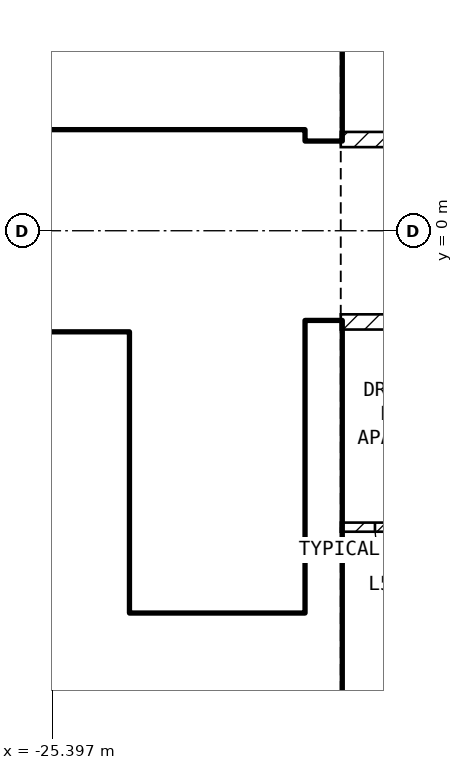
"""IFC4 building model, lengths in metres.
Left out: names, types, materials, properties, quantities, classifications, styles, units other than length and angle.
Written with IfcOpenShell. Run it as: python <this file> out.ifc"""

import sys

from ifc_helpers import new_model, si_unit, direction, frame, frame_2d, origin, place, context, subcontext, project, spatial, rectangle, extrude, element, fill, save


model = new_model("IFC4")
c1 = context("Model", 3, precision=1e-05, world=origin(), true_north=direction((0.0, 1.0)))
c2 = subcontext(c1, "Body", "Model", "MODEL_VIEW")
j1 = project(units=[si_unit("LENGTHUNIT", "METRE"), si_unit("PLANEANGLEUNIT", "RADIAN")], contexts=[c1])
p1 = place(None, origin())
s1 = spatial("IfcSite", under=j1, at=p1, CompositionType="ELEMENT")
p2 = place(p1, origin())
s2 = spatial("IfcBuilding", under=s1, at=p2, CompositionType="ELEMENT")
p3 = place(p2, frame((0.0, 0.0, 236.0)))
s3 = spatial("IfcBuildingStorey", under=s2, at=p3, CompositionType="ELEMENT", Elevation=236.0)
for number, where, z_axis, x_axis in (
    (1, (-21.825, -8.1, 0.0), (0.0, 0.0, 1.0), (0.0, 1.0, 0.0)),
    (2, (-21.825, 1.2, 0.0), (0.0, 0.0, 1.0), (0.0, 1.0, 0.0)),
):
    element("IfcWall", number, at=place(p3, frame(where, z_axis=z_axis, x_axis=x_axis)), inside=s3, PredefinedType="SHEAR", context=c2, shape_type="SweptSolid", body=[
        extrude(rectangle(XDim=6.9, YDim=0.45, at=frame_2d((3.45, 0.0))), origin(), (0.0, 0.0, 1.0), 3.25),
    ])
p4 = place(p3, frame((-33.35, 1.45, 0.0), z_axis=(0.0, 0.0, 1.0), x_axis=(1.0, 0.0, 0.0)))
e3 = element("IfcWall", 3, at=p4, inside=s3, PredefinedType="SOLIDWALL", context=c2, shape_type="SweptSolid", body=[
    extrude(rectangle(XDim=11.3, YDim=0.2, at=frame_2d((5.65, 0.0))), origin(), (0.0, 0.0, 1.0), 3.25),
])
p5 = place(p4, frame((9.55, 0.0, 0.0)))
e4 = element("IfcOpeningElement", 4, at=p5, cuts=e3, PredefinedType="OPENING", context=c2, shape_type="SweptSolid", body=[
    extrude(rectangle(XDim=1.0, YDim=2.1, at=frame_2d((0.5, 1.05))), frame((0.0, 0.11, 0.0), z_axis=(0.0, -1.0, 0.0), x_axis=(1.0, 0.0, 0.0)), (0.0, 0.0, 1.0), 0.22),
])
p6 = place(p4, frame((7.05, 0.0, 0.0)))
e5 = element("IfcOpeningElement", 5, at=p6, cuts=e3, PredefinedType="OPENING", context=c2, shape_type="SweptSolid", body=[
    extrude(rectangle(XDim=1.0, YDim=2.1, at=frame_2d((0.5, 1.05))), frame((0.0, 0.11, 0.0), z_axis=(0.0, -1.0, 0.0), x_axis=(1.0, 0.0, 0.0)), (0.0, 0.0, 1.0), 0.22),
])
p7 = place(p4, frame((1.175, 0.0, 0.0)))
e6 = element("IfcOpeningElement", 6, at=p7, cuts=e3, PredefinedType="OPENING", context=c2, shape_type="SweptSolid", body=[
    extrude(rectangle(XDim=0.9, YDim=2.1, at=frame_2d((0.45, 1.05))), frame((0.0, 0.11, 0.0), z_axis=(0.0, -1.0, 0.0), x_axis=(1.0, 0.0, 0.0)), (0.0, 0.0, 1.0), 0.22),
])
p8 = place(p3, frame((-24.5, -5.05, 0.0), z_axis=(0.0, 0.0, 1.0), x_axis=(0.0, 1.0, 0.0)))
e7 = element("IfcWall", 7, at=p8, inside=s3, PredefinedType="SOLIDWALL", context=c2, shape_type="SweptSolid", body=[
    extrude(rectangle(XDim=3.7, YDim=0.2, at=frame_2d((1.85, 0.0))), origin(), (0.0, 0.0, 1.0), 3.25),
])
p9 = place(p8, frame((0.1, 0.0, 0.0)))
e8 = element("IfcOpeningElement", 8, at=p9, cuts=e7, PredefinedType="OPENING", context=c2, shape_type="SweptSolid", body=[
    extrude(rectangle(XDim=0.8, YDim=2.1, at=frame_2d((0.4, 1.05))), frame((0.0, 0.11, 0.0), z_axis=(0.0, -1.0, 0.0), x_axis=(1.0, 0.0, 0.0)), (0.0, 0.0, 1.0), 0.22),
])
p10 = place(p3, frame((-28.35, -5.15, 0.0), z_axis=(0.0, 0.0, 1.0), x_axis=(1.0, 0.0, 0.0)))
e9 = element("IfcWall", 9, at=p10, inside=s3, PredefinedType="SOLIDWALL", context=c2, shape_type="SweptSolid", body=[
    extrude(rectangle(XDim=6.3, YDim=0.2, at=frame_2d((3.15, 0.0))), origin(), (0.0, 0.0, 1.0), 3.25),
])
p11 = place(p10, frame((5.1, 0.0, 0.0)))
e10 = element("IfcOpeningElement", 10, at=p11, cuts=e9, PredefinedType="OPENING", context=c2, shape_type="SweptSolid", body=[
    extrude(rectangle(XDim=1.0, YDim=2.1, at=frame_2d((0.5, 1.05))), frame((0.0, 0.11, 0.0), z_axis=(0.0, -1.0, 0.0), x_axis=(1.0, 0.0, 0.0)), (0.0, 0.0, 1.0), 0.22),
])
p12 = place(p3, frame((-33.35, -1.45, 0.0), z_axis=(0.0, 0.0, 1.0), x_axis=(1.0, 0.0, 0.0)))
e11 = element("IfcWall", 11, at=p12, inside=s3, PredefinedType="SOLIDWALL", context=c2, shape_type="SweptSolid", body=[
    extrude(rectangle(XDim=8.75, YDim=0.2, at=frame_2d((4.375, 0.0))), origin(), (0.0, 0.0, 1.0), 3.25),
])
p13 = place(p12, frame((7.35, 0.0, 0.0)))
e12 = element("IfcOpeningElement", 12, at=p13, cuts=e11, PredefinedType="OPENING", context=c2, shape_type="SweptSolid", body=[
    extrude(rectangle(XDim=1.0, YDim=2.1, at=frame_2d((0.5, 1.05))), frame((0.0, 0.11, 0.0), z_axis=(0.0, -1.0, 0.0), x_axis=(1.0, 0.0, 0.0)), (0.0, 0.0, 1.0), 0.22),
])
p14 = place(p12, frame((5.35, 0.0, 0.0)))
e13 = element("IfcOpeningElement", 13, at=p14, cuts=e11, PredefinedType="OPENING", context=c2, shape_type="SweptSolid", body=[
    extrude(rectangle(XDim=1.0, YDim=2.1, at=frame_2d((0.5, 1.05))), frame((0.0, 0.11, 0.0), z_axis=(0.0, -1.0, 0.0), x_axis=(1.0, 0.0, 0.0)), (0.0, 0.0, 1.0), 0.22),
])
p15 = place(p12, frame((3.35, 0.0, 0.0)))
e14 = element("IfcOpeningElement", 14, at=p15, cuts=e11, PredefinedType="OPENING", context=c2, shape_type="SweptSolid", body=[
    extrude(rectangle(XDim=1.0, YDim=2.1, at=frame_2d((0.5, 1.05))), frame((0.0, 0.11, 0.0), z_axis=(0.0, -1.0, 0.0), x_axis=(1.0, 0.0, 0.0)), (0.0, 0.0, 1.0), 0.22),
])
p16 = place(p12, frame((0.925, 0.0, 0.0)))
e15 = element("IfcOpeningElement", 15, at=p16, cuts=e11, PredefinedType="OPENING", context=c2, shape_type="SweptSolid", body=[
    extrude(rectangle(XDim=0.9, YDim=2.1, at=frame_2d((0.45, 1.05))), frame((0.0, 0.11, 0.0), z_axis=(0.0, -1.0, 0.0), x_axis=(1.0, 0.0, 0.0)), (0.0, 0.0, 1.0), 0.22),
])
p17 = place(p3, frame((-33.35, -3.95, 0.0), z_axis=(0.0, 0.0, 1.0), x_axis=(1.0, 0.0, 0.0)))
e16 = element("IfcWall", 16, at=p17, inside=s3, PredefinedType="SOLIDWALL", context=c2, shape_type="SweptSolid", body=[
    extrude(rectangle(XDim=8.75, YDim=0.2, at=frame_2d((4.375, 0.0))), origin(), (0.0, 0.0, 1.0), 3.25),
])
p18 = place(p3, frame((-21.6, 1.2, 0.0), z_axis=(0.0, 0.0, 1.0), x_axis=(1.0, 0.0, 0.0)))
e17 = element("IfcWall", 17, at=p18, inside=s3, PredefinedType="PARTITIONING", context=c2, shape_type="SweptSolid", body=[
    extrude(rectangle(XDim=17.2, YDim=0.2, at=frame_2d((8.6, 0.0))), origin(), (0.0, 0.0, 1.0), 3.25),
])
p19 = place(p18, frame((6.1, 0.0, 0.0)))
e18 = element("IfcOpeningElement", 18, at=p19, cuts=e17, PredefinedType="OPENING", context=c2, shape_type="SweptSolid", body=[
    extrude(rectangle(XDim=1.0, YDim=2.1, at=frame_2d((0.5, 1.05))), frame((0.0, 0.11, 0.0), z_axis=(0.0, -1.0, 0.0), x_axis=(1.0, 0.0, 0.0)), (0.0, 0.0, 1.0), 0.22),
])
p20 = place(p3, frame((-4.4, -1.2, 0.0), z_axis=(0.0, 0.0, 1.0), x_axis=(-1.0, 0.0, 0.0)))
e19 = element("IfcWall", 19, at=p20, inside=s3, PredefinedType="PARTITIONING", context=c2, shape_type="SweptSolid", body=[
    extrude(rectangle(XDim=17.2, YDim=0.2, at=frame_2d((8.6, 0.0))), origin(), (0.0, 0.0, 1.0), 3.25),
])
p21 = place(p20, frame((5.9, 0.0, 0.0)))
e20 = element("IfcOpeningElement", 20, at=p21, cuts=e19, PredefinedType="OPENING", context=c2, shape_type="SweptSolid", body=[
    extrude(rectangle(XDim=1.0, YDim=2.1, at=frame_2d((0.5, 1.05))), frame((0.0, 0.11, 0.0), z_axis=(0.0, -1.0, 0.0), x_axis=(1.0, 0.0, 0.0)), (0.0, 0.0, 1.0), 0.22),
])
p22 = place(p3, frame((-19.8, -3.9, 0.0), z_axis=(0.0, 0.0, 1.0), x_axis=(-1.0, 0.0, 0.0)))
e21 = element("IfcWall", 21, at=p22, inside=s3, PredefinedType="PARTITIONING", context=c2, shape_type="SweptSolid", body=[
    extrude(rectangle(XDim=1.8, YDim=0.12, at=frame_2d((0.9, 0.0))), origin(), (0.0, 0.0, 1.0), 3.25),
])
p23 = place(p22, frame((0.45, 0.0, 0.0)))
e22 = element("IfcOpeningElement", 22, at=p23, cuts=e21, PredefinedType="OPENING", context=c2, shape_type="SweptSolid", body=[
    extrude(rectangle(XDim=0.9, YDim=2.1, at=frame_2d((0.45, 1.05))), frame((0.0, 0.07, 0.0), z_axis=(0.0, -1.0, 0.0), x_axis=(1.0, 0.0, 0.0)), (0.0, 0.0, 1.0), 0.14),
])
p24 = place(p13, origin())
e23 = element("IfcDoor", 23, at=p24, inside=s3, OperationType="DOUBLE_DOOR_SLIDING", PredefinedType="DOOR", context=c2, shape_type="SweptSolid", body=[
    extrude(rectangle(XDim=1.0, YDim=2.1, at=frame_2d((0.5, 1.05))), frame((0.0, 0.025, 0.0), z_axis=(0.0, -1.0, 0.0), x_axis=(1.0, 0.0, 0.0)), (0.0, 0.0, 1.0), 0.05),
])
fill(e12, e23)
p25 = place(p11, origin())
e24 = element("IfcDoor", 24, at=p25, inside=s3, OperationType="SINGLE_SWING_LEFT", PredefinedType="DOOR", context=c2, shape_type="SweptSolid", body=[
    extrude(rectangle(XDim=1.0, YDim=2.1, at=frame_2d((0.5, 1.05))), frame((0.0, 0.025, 0.0), z_axis=(0.0, -1.0, 0.0), x_axis=(1.0, 0.0, 0.0)), (0.0, 0.0, 1.0), 0.05),
])
fill(e10, e24)
p26 = place(p5, origin())
e25 = element("IfcDoor", 25, at=p26, inside=s3, OperationType="SINGLE_SWING_LEFT", PredefinedType="DOOR", context=c2, shape_type="SweptSolid", body=[
    extrude(rectangle(XDim=1.0, YDim=2.1, at=frame_2d((0.5, 1.05))), frame((0.0, 0.025, 0.0), z_axis=(0.0, -1.0, 0.0), x_axis=(1.0, 0.0, 0.0)), (0.0, 0.0, 1.0), 0.05),
])
fill(e4, e25)
p27 = place(p9, origin())
e26 = element("IfcDoor", 26, at=p27, inside=s3, OperationType="SINGLE_SWING_LEFT", PredefinedType="DOOR", context=c2, shape_type="SweptSolid", body=[
    extrude(rectangle(XDim=0.8, YDim=2.1, at=frame_2d((0.4, 1.05))), frame((0.0, 0.025, 0.0), z_axis=(0.0, -1.0, 0.0), x_axis=(1.0, 0.0, 0.0)), (0.0, 0.0, 1.0), 0.05),
])
fill(e8, e26)
p28 = place(p6, origin())
e27 = element("IfcDoor", 27, at=p28, inside=s3, OperationType="SINGLE_SWING_LEFT", PredefinedType="DOOR", context=c2, shape_type="SweptSolid", body=[
    extrude(rectangle(XDim=1.0, YDim=2.1, at=frame_2d((0.5, 1.05))), frame((0.0, 0.025, 0.0), z_axis=(0.0, -1.0, 0.0), x_axis=(1.0, 0.0, 0.0)), (0.0, 0.0, 1.0), 0.05),
])
fill(e5, e27)
p29 = place(p23, origin())
e28 = element("IfcDoor", 28, at=p29, inside=s3, OperationType="SINGLE_SWING_LEFT", PredefinedType="DOOR", context=c2, shape_type="SweptSolid", body=[
    extrude(rectangle(XDim=0.9, YDim=2.1, at=frame_2d((0.45, 1.05))), frame((0.0, 0.025, 0.0), z_axis=(0.0, -1.0, 0.0), x_axis=(1.0, 0.0, 0.0)), (0.0, 0.0, 1.0), 0.05),
])
fill(e22, e28)
save(model, sys.argv[1])
